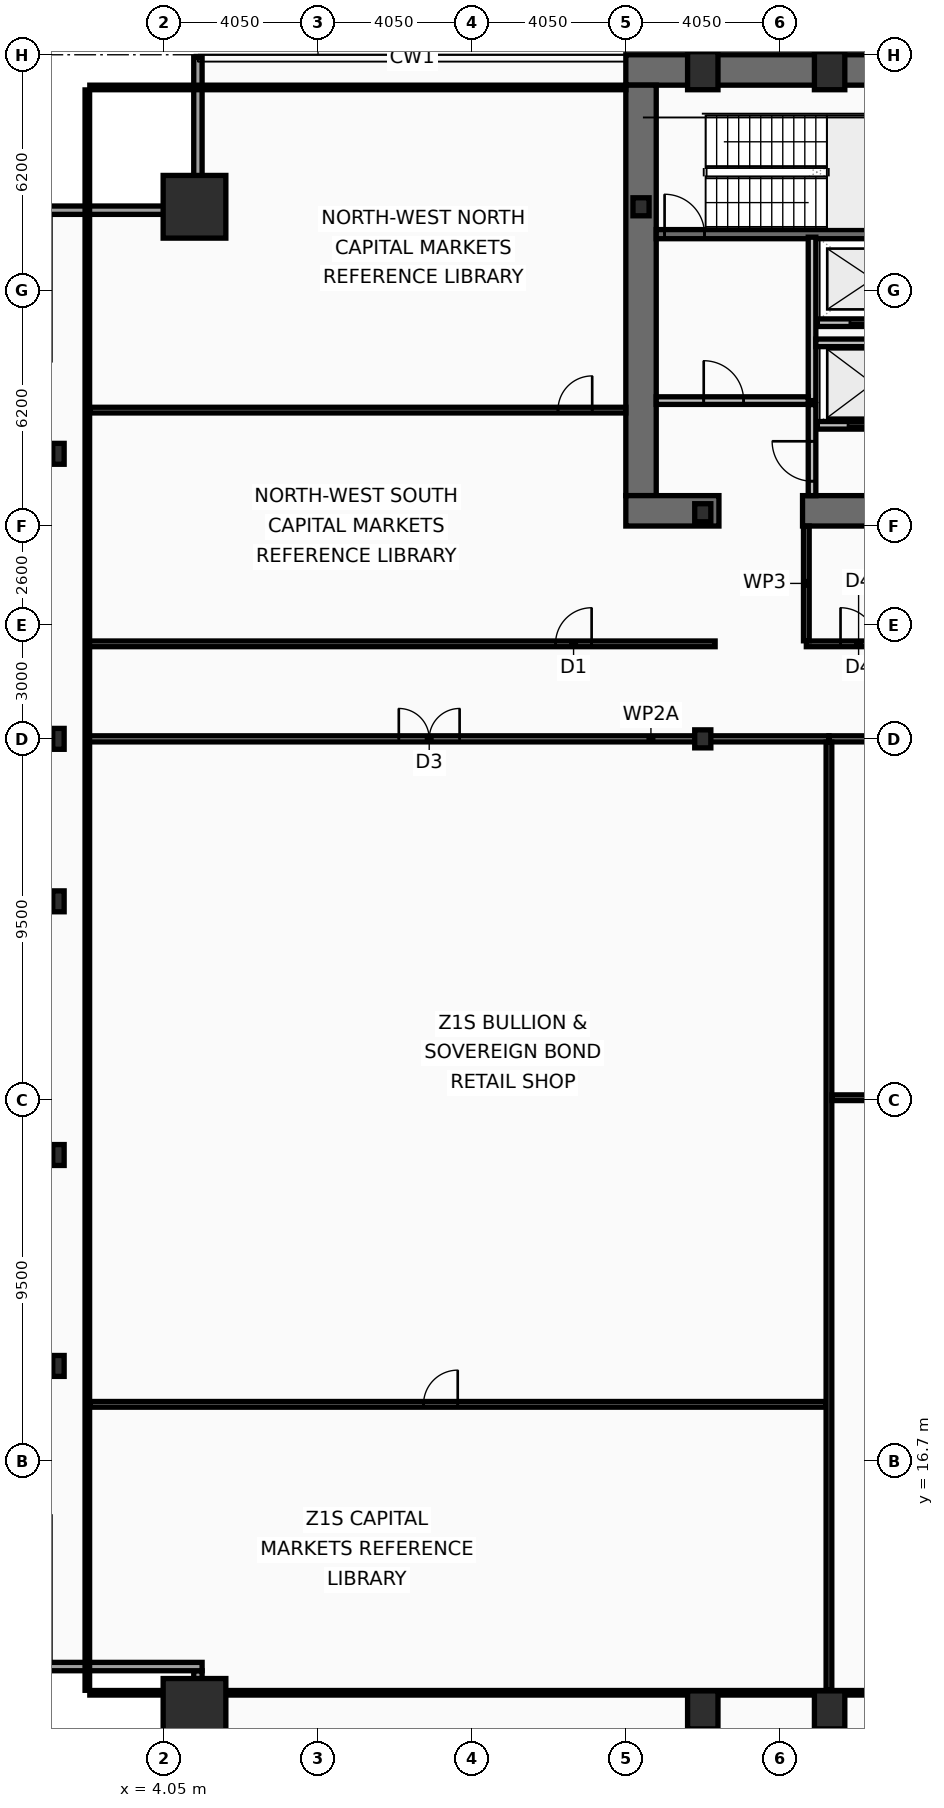
"""IFC4 building model, lengths in metres.
Left out: names, types, materials, properties, quantities, classifications, styles, units other than length and angle.
Written with IfcOpenShell. Run it as: python <this file> out.ifc"""

import sys

from ifc_helpers import new_model, si_unit, direction, frame, frame_2d, origin, origin_2d, place, context, subcontext, project, spatial, rectangle, hollow_rectangle, i_section, extrude, element, fill, save


model = new_model("IFC4")
c1 = context("Model", 3, precision=1e-05, world=origin(), true_north=direction((0.0, 1.0)))
c2 = subcontext(c1, "Body", "Model", "MODEL_VIEW")
j1 = project(units=[si_unit("LENGTHUNIT", "METRE"), si_unit("PLANEANGLEUNIT", "RADIAN")], contexts=[c1])
p1 = place(None, origin())
s1 = spatial("IfcSite", under=j1, at=p1, CompositionType="ELEMENT")
p2 = place(p1, origin())
s2 = spatial("IfcBuilding", under=s1, at=p2, CompositionType="ELEMENT")
p3 = place(p2, frame((0.0, 0.0, 53.8)))
s3 = spatial("IfcBuildingStorey", under=s2, at=p3, CompositionType="ELEMENT", Elevation=53.8)
p4 = place(p3, frame((16.2, 53.3, 0.0), z_axis=(0.0, 0.0, 1.0), x_axis=(1.0, 0.0, 0.0)))
e1 = element("IfcWall", 1, at=p4, inside=s3, PredefinedType="SHEAR", context=c2, shape_type="SweptSolid", body=[
    extrude(rectangle(XDim=40.5, YDim=0.8, at=frame_2d((20.25, 0.0))), origin(), (0.0, 0.0, 1.0), 3.82),
])
p5 = place(p3, frame((16.6, 42.1, 0.0), z_axis=(0.0, 0.0, 1.0), x_axis=(0.0, 1.0, 0.0)))
e2 = element("IfcWall", 2, at=p5, inside=s3, PredefinedType="SHEAR", context=c2, shape_type="SweptSolid", body=[
    extrude(rectangle(XDim=10.8, YDim=0.8, at=frame_2d((5.4, 0.0))), origin(), (0.0, 0.0, 1.0), 3.82),
])
p6 = place(p3, frame((18.65, 41.7, 0.0), z_axis=(0.0, 0.0, 1.0), x_axis=(-1.0, 0.0, 0.0)))
e3 = element("IfcWall", 3, at=p6, inside=s3, PredefinedType="SHEAR", context=c2, shape_type="SweptSolid", body=[
    extrude(rectangle(XDim=2.45, YDim=0.8, at=frame_2d((1.225, 0.0))), origin(), (0.0, 0.0, 1.0), 3.82),
])
p7 = place(p3, frame((32.3, 41.7, 0.0), z_axis=(0.0, 0.0, 1.0), x_axis=(-1.0, 0.0, 0.0)))
e4 = element("IfcWall", 4, at=p7, inside=s3, PredefinedType="SHEAR", context=c2, shape_type="SweptSolid", body=[
    extrude(rectangle(XDim=11.45, YDim=0.8, at=frame_2d((5.725, 0.0))), origin(), (0.0, 0.0, 1.0), 3.82),
])
p8 = place(p3, frame((17.0, 48.98, 0.0), z_axis=(0.0, 0.0, 1.0), x_axis=(1.0, 0.0, 0.0)))
e5 = element("IfcWall", 5, at=p8, inside=s3, PredefinedType="SHEAR", context=c2, shape_type="SweptSolid", body=[
    extrude(rectangle(XDim=7.22, YDim=0.24, at=frame_2d((3.61, 0.0))), origin(), (0.0, 0.0, 1.0), 3.82),
])
p9 = place(p8, frame((0.22, 0.0, 0.0)))
e6 = element("IfcOpeningElement", 6, at=p9, cuts=e5, PredefinedType="OPENING", context=c2, shape_type="SweptSolid", body=[
    extrude(rectangle(XDim=1.05, YDim=2.15, at=frame_2d((0.525, 1.075))), frame((0.0, 0.13, 0.0), z_axis=(0.0, -1.0, 0.0), x_axis=(1.0, 0.0, 0.0)), (0.0, 0.0, 1.0), 0.26),
])
for number, where, z_axis, x_axis in (
    (7, (4.85, 10.15, 0.0), (0.0, 0.0, 1.0), (1.0, 0.0, 0.0)),
    (8, (4.85, 49.7, 0.0), (0.0, 0.0, 1.0), (1.0, 0.0, 0.0)),
):
    element("IfcColumn", number, at=place(p3, frame(where, z_axis=z_axis, x_axis=x_axis)), inside=s3, PredefinedType="COLUMN", context=c2, shape_type="SweptSolid", body=[
        extrude(hollow_rectangle(XDim=1.65, YDim=1.65, WallThickness=0.075, at=origin_2d()), origin(), (0.0, 0.0, 1.0), 4.0),
    ])
for number, where, z_axis, x_axis in (
    (9, (18.225, 10.15, 0.0), (0.0, 0.0, 1.0), (1.0, 0.0, 0.0)),
    (10, (21.562, 10.15, 0.0), (0.0, 0.0, 1.0), (1.0, 0.0, 0.0)),
    (11, (18.225, 53.28, 0.0), (0.0, 0.0, 1.0), (1.0, 0.0, 0.0)),
    (12, (21.562, 53.28, 0.0), (0.0, 0.0, 1.0), (1.0, 0.0, 0.0)),
):
    element("IfcColumn", number, at=place(p3, frame(where, z_axis=z_axis, x_axis=x_axis)), inside=s3, PredefinedType="COLUMN", context=c2, shape_type="SweptSolid", body=[
        extrude(hollow_rectangle(XDim=0.8, YDim=1.0, WallThickness=0.055, at=origin_2d()), origin(), (0.0, 0.0, 1.0), 4.0),
    ])
for number, where, z_axis, x_axis in (
    (13, (1.27, 19.2, 0.0), (0.0, 0.0, 1.0), (1.0, 0.0, 0.0)),
    (14, (1.27, 24.75, 0.0), (0.0, 0.0, 1.0), (1.0, 0.0, 0.0)),
    (15, (1.27, 31.425, 0.0), (0.0, 0.0, 1.0), (1.0, 0.0, 0.0)),
    (16, (1.27, 35.7, 0.0), (0.0, 0.0, 1.0), (1.0, 0.0, 0.0)),
    (17, (1.27, 43.2, 0.0), (0.0, 0.0, 1.0), (1.0, 0.0, 0.0)),
):
    element("IfcColumn", number, at=place(p3, frame(where, z_axis=z_axis, x_axis=x_axis)), inside=s3, PredefinedType="COLUMN", context=c2, shape_type="SweptSolid", body=[
        extrude(i_section(OverallWidth=0.3, OverallDepth=0.55, WebThickness=0.015, FlangeThickness=0.029, at=origin_2d()), origin(), (0.0, 0.0, 1.0), 4.0),
    ])
for number, where, z_axis, x_axis in (
    (18, (16.6, 49.7, 0.0), (0.0, 0.0, 1.0), (1.0, 0.0, 0.0)),
    (19, (18.225, 35.7, 0.0), (0.0, 0.0, 1.0), (1.0, 0.0, 0.0)),
    (20, (18.225, 41.65, 0.0), (0.0, 0.0, 1.0), (1.0, 0.0, 0.0)),
):
    element("IfcColumn", number, at=place(p3, frame(where, z_axis=z_axis, x_axis=x_axis)), inside=s3, PredefinedType="COLUMN", context=c2, shape_type="SweptSolid", body=[
        extrude(i_section(OverallWidth=0.424, OverallDepth=0.474, WebThickness=0.048, FlangeThickness=0.077, at=origin_2d()), origin(), (0.0, 0.0, 1.0), 4.0),
    ])
p10 = place(p3, frame((4.94, 7.27, 0.0), z_axis=(0.0, 0.0, 1.0), x_axis=(0.0, 1.0, 0.0)))
e21 = element("IfcWall", 21, at=p10, inside=s3, PredefinedType="SOLIDWALL", context=c2, shape_type="SweptSolid", body=[
    extrude(rectangle(XDim=3.91, YDim=0.22, at=frame_2d((1.955, 0.0))), origin(), (0.0, 0.0, 1.0), 3.16),
])
for number, where, z_axis, x_axis in (
    (22, (5.05, 11.29, 0.0), (0.0, 0.0, 1.0), (-1.0, 0.0, 0.0)),
    (23, (0.83, 49.61, 0.0), (0.0, 0.0, 1.0), (1.0, 0.0, 0.0)),
):
    element("IfcWall", number, at=place(p3, frame(where, z_axis=z_axis, x_axis=x_axis)), inside=s3, PredefinedType="SOLIDWALL", context=c2, shape_type="SweptSolid", body=[
        extrude(rectangle(XDim=4.22, YDim=0.22, at=frame_2d((2.11, 0.0))), origin(), (0.0, 0.0, 1.0), 3.16),
    ])
p11 = place(p3, frame((4.94, 49.72, 0.0), z_axis=(0.0, 0.0, 1.0), x_axis=(0.0, 1.0, 0.0)))
e24 = element("IfcWall", 24, at=p11, inside=s3, PredefinedType="SOLIDWALL", context=c2, shape_type="SweptSolid", body=[
    extrude(rectangle(XDim=3.91, YDim=0.22, at=frame_2d((1.955, 0.0))), origin(), (0.0, 0.0, 1.0), 3.16),
])
p12 = place(p3, frame((24.21, 43.95, 0.0), z_axis=(0.0, 0.0, 1.0), x_axis=(-1.0, 0.0, 0.0)))
e25 = element("IfcWall", 25, at=p12, inside=s3, PredefinedType="PARTITIONING", context=c2, shape_type="SweptSolid", body=[
    extrude(rectangle(XDim=2.97, YDim=0.2, at=frame_2d((1.485, 0.0))), origin(), (0.0, 0.0, 1.0), 3.82),
])
p13 = place(p12, frame((0.86, 0.0, 0.0)))
e26 = element("IfcOpeningElement", 26, at=p13, cuts=e25, PredefinedType="OPENING", context=c2, shape_type="SweptSolid", body=[
    extrude(rectangle(XDim=1.3, YDim=2.18, at=frame_2d((0.65, 1.09))), frame((0.0, 0.11, 0.0), z_axis=(0.0, -1.0, 0.0), x_axis=(1.0, 0.0, 0.0)), (0.0, 0.0, 1.0), 0.22),
])
p14 = place(p3, frame((24.21, 46.65, 0.0), z_axis=(0.0, 0.0, 1.0), x_axis=(-1.0, 0.0, 0.0)))
e27 = element("IfcWall", 27, at=p14, inside=s3, PredefinedType="PARTITIONING", context=c2, shape_type="SweptSolid", body=[
    extrude(rectangle(XDim=2.97, YDim=0.2, at=frame_2d((1.485, 0.0))), origin(), (0.0, 0.0, 1.0), 3.82),
])
p15 = place(p14, frame((0.91, 0.0, 0.0)))
e28 = element("IfcOpeningElement", 28, at=p15, cuts=e27, PredefinedType="OPENING", context=c2, shape_type="SweptSolid", body=[
    extrude(rectangle(XDim=1.2, YDim=2.18, at=frame_2d((0.6, 1.09))), frame((0.0, 0.11, 0.0), z_axis=(0.0, -1.0, 0.0), x_axis=(1.0, 0.0, 0.0)), (0.0, 0.0, 1.0), 0.22),
])
p16 = place(p3, frame((21.1, 44.6, 0.0), z_axis=(0.0, 0.0, 1.0), x_axis=(0.0, 1.0, 0.0)))
e29 = element("IfcWall", 29, at=p16, inside=s3, PredefinedType="PARTITIONING", context=c2, shape_type="SweptSolid", body=[
    extrude(rectangle(XDim=4.3, YDim=0.2, at=frame_2d((2.15, 0.0))), origin(), (0.0, 0.0, 1.0), 3.82),
])
p17 = place(p3, frame((17.0, 44.6, 0.0), z_axis=(0.0, 0.0, 1.0), x_axis=(1.0, 0.0, 0.0)))
e30 = element("IfcWall", 30, at=p17, inside=s3, PredefinedType="PARTITIONING", context=c2, shape_type="SweptSolid", body=[
    extrude(rectangle(XDim=4.0, YDim=0.2, at=frame_2d((2.0, 0.0))), origin(), (0.0, 0.0, 1.0), 3.82),
])
p18 = place(p17, frame((1.25, 0.0, 0.0)))
e31 = element("IfcOpeningElement", 31, at=p18, cuts=e30, PredefinedType="OPENING", context=c2, shape_type="SweptSolid", body=[
    extrude(rectangle(XDim=1.05, YDim=2.15, at=frame_2d((0.525, 1.075))), frame((0.0, 0.11, 0.0), z_axis=(0.0, -1.0, 0.0), x_axis=(1.0, 0.0, 0.0)), (0.0, 0.0, 1.0), 0.22),
])
p19 = place(p3, frame((21.2, 46.12, 0.0), z_axis=(0.0, 0.0, 1.0), x_axis=(1.0, 0.0, 0.0)))
e32 = element("IfcWall", 32, at=p19, inside=s3, PredefinedType="PARTITIONING", context=c2, shape_type="SweptSolid", body=[
    extrude(rectangle(XDim=3.02, YDim=0.2, at=frame_2d((1.51, 0.0))), origin(), (0.0, 0.0, 1.0), 3.82),
])
p20 = place(p3, frame((21.1, 42.1, 0.0), z_axis=(0.0, 0.0, 1.0), x_axis=(0.0, 1.0, 0.0)))
e33 = element("IfcWall", 33, at=p20, inside=s3, PredefinedType="PARTITIONING", context=c2, shape_type="SweptSolid", body=[
    extrude(rectangle(XDim=2.395, YDim=0.2, at=frame_2d((1.198, 0.0))), origin(), (0.0, 0.0, 1.0), 3.82),
])
p21 = place(p20, frame((0.38, 0.0, 0.0)))
e34 = element("IfcOpeningElement", 34, at=p21, cuts=e33, PredefinedType="OPENING", context=c2, shape_type="SweptSolid", body=[
    extrude(rectangle(XDim=1.05, YDim=2.15, at=frame_2d((0.525, 1.075))), frame((0.0, 0.11, 0.0), z_axis=(0.0, -1.0, 0.0), x_axis=(1.0, 0.0, 0.0)), (0.0, 0.0, 1.0), 0.22),
])
p22 = place(p3, frame((20.95, 38.2, 0.0), z_axis=(0.0, 0.0, 1.0), x_axis=(1.0, 0.0, 0.0)))
e35 = element("IfcWall", 35, at=p22, inside=s3, PredefinedType="PARTITIONING", context=c2, shape_type="SweptSolid", body=[
    extrude(rectangle(XDim=4.55, YDim=0.15, at=frame_2d((2.275, 0.0))), origin(), (0.0, 0.0, 1.0), 3.01),
])
p23 = place(p22, frame((0.9, 0.0, 0.0)))
e36 = element("IfcOpeningElement", 36, at=p23, cuts=e35, PredefinedType="OPENING", context=c2, shape_type="SweptSolid", body=[
    extrude(rectangle(XDim=0.95, YDim=2.05, at=frame_2d((0.475, 1.025))), frame((0.0, 0.085, 0.0), z_axis=(0.0, -1.0, 0.0), x_axis=(1.0, 0.0, 0.0)), (0.0, 0.0, 1.0), 0.17),
])
p24 = place(p3, frame((20.95, 38.28, 0.0), z_axis=(0.0, 0.0, 1.0), x_axis=(0.0, 1.0, 0.0)))
e37 = element("IfcWall", 37, at=p24, inside=s3, PredefinedType="PARTITIONING", context=c2, shape_type="SweptSolid", body=[
    extrude(rectangle(XDim=3.02, YDim=0.15, at=frame_2d((1.51, 0.0))), origin(), (0.0, 0.0, 1.0), 3.82),
])
p25 = place(p3, frame((2.03, 38.2, 0.0), z_axis=(0.0, 0.0, 1.0), x_axis=(1.0, 0.0, 0.0)))
e38 = element("IfcWall", 38, at=p25, inside=s3, PredefinedType="PARTITIONING", context=c2, shape_type="SweptSolid", body=[
    extrude(rectangle(XDim=16.52, YDim=0.15, at=frame_2d((8.26, 0.0))), origin(), (0.0, 0.0, 1.0), 3.01),
])
p26 = place(p25, frame((12.32, 0.0, 0.0)))
e39 = element("IfcOpeningElement", 39, at=p26, cuts=e38, PredefinedType="OPENING", context=c2, shape_type="SweptSolid", body=[
    extrude(rectangle(XDim=0.95, YDim=2.05, at=frame_2d((0.475, 1.025))), frame((0.0, 0.085, 0.0), z_axis=(0.0, -1.0, 0.0), x_axis=(1.0, 0.0, 0.0)), (0.0, 0.0, 1.0), 0.17),
])
p27 = place(p3, frame((2.095, 44.35, 0.0), z_axis=(0.0, 0.0, 1.0), x_axis=(1.0, 0.0, 0.0)))
e40 = element("IfcWall", 40, at=p27, inside=s3, PredefinedType="PARTITIONING", context=c2, shape_type="SweptSolid", body=[
    extrude(rectangle(XDim=14.105, YDim=0.15, at=frame_2d((7.052, 0.0))), origin(), (0.0, 0.0, 1.0), 3.16),
])
p28 = place(p27, frame((12.32, 0.0, 0.0)))
e41 = element("IfcOpeningElement", 41, at=p28, cuts=e40, PredefinedType="OPENING", context=c2, shape_type="SweptSolid", body=[
    extrude(rectangle(XDim=0.9, YDim=2.05, at=frame_2d((0.45, 1.025))), frame((0.0, 0.085, 0.0), z_axis=(0.0, -1.0, 0.0), x_axis=(1.0, 0.0, 0.0)), (0.0, 0.0, 1.0), 0.17),
])
p29 = place(p3, frame((2.03, 35.7, 0.0), z_axis=(0.0, 0.0, 1.0), x_axis=(1.0, 0.0, 0.0)))
e42 = element("IfcWall", 42, at=p29, inside=s3, PredefinedType="PARTITIONING", context=c2, shape_type="SweptSolid", body=[
    extrude(rectangle(XDim=19.515, YDim=0.16, at=frame_2d((9.758, 0.0))), origin(), (0.0, 0.0, 1.0), 3.01),
])
p30 = place(p29, frame((8.196, 0.0, 0.0)))
e43 = element("IfcOpeningElement", 43, at=p30, cuts=e42, PredefinedType="OPENING", context=c2, shape_type="SweptSolid", body=[
    extrude(rectangle(XDim=1.6, YDim=2.15, at=frame_2d((0.8, 1.075))), frame((0.0, 0.09, 0.0), z_axis=(0.0, -1.0, 0.0), x_axis=(1.0, 0.0, 0.0)), (0.0, 0.0, 1.0), 0.18),
])
p31 = place(p3, frame((2.095, 18.19, 0.0), z_axis=(0.0, 0.0, 1.0), x_axis=(1.0, 0.0, 0.0)))
e44 = element("IfcWall", 44, at=p31, inside=s3, PredefinedType="PARTITIONING", context=c2, shape_type="SweptSolid", body=[
    extrude(rectangle(XDim=19.37, YDim=0.15, at=frame_2d((9.685, 0.0))), origin(), (0.0, 0.0, 1.0), 3.01),
])
p32 = place(p31, frame((8.782, 0.0, 0.0)))
e45 = element("IfcOpeningElement", 45, at=p32, cuts=e44, PredefinedType="OPENING", context=c2, shape_type="SweptSolid", body=[
    extrude(rectangle(XDim=0.9, YDim=2.05, at=frame_2d((0.45, 1.025))), frame((0.0, 0.085, 0.0), z_axis=(0.0, -1.0, 0.0), x_axis=(1.0, 0.0, 0.0)), (0.0, 0.0, 1.0), 0.17),
])
p33 = place(p3, frame((21.545, 35.7, 0.0), z_axis=(0.0, 0.0, 1.0), x_axis=(1.0, 0.0, 0.0)))
e46 = element("IfcWall", 46, at=p33, inside=s3, PredefinedType="PARTITIONING", context=c2, shape_type="SweptSolid", body=[
    extrude(rectangle(XDim=13.068, YDim=0.16, at=frame_2d((6.534, 0.0))), origin(), (0.0, 0.0, 1.0), 3.01),
])
p34 = place(p33, frame((5.489, 0.0, 0.0)))
e47 = element("IfcOpeningElement", 47, at=p34, cuts=e46, PredefinedType="OPENING", context=c2, shape_type="SweptSolid", body=[
    extrude(rectangle(XDim=1.0, YDim=2.05, at=frame_2d((0.5, 1.025))), frame((0.0, 0.09, 0.0), z_axis=(0.0, -1.0, 0.0), x_axis=(1.0, 0.0, 0.0)), (0.0, 0.0, 1.0), 0.18),
])
p35 = place(p3, frame((21.545, 10.665, 0.0), z_axis=(0.0, 0.0, 1.0), x_axis=(0.0, 1.0, 0.0)))
e48 = element("IfcWall", 48, at=p35, inside=s3, PredefinedType="PARTITIONING", context=c2, shape_type="SweptSolid", body=[
    extrude(rectangle(XDim=24.95, YDim=0.15, at=frame_2d((12.475, 0.0))), origin(), (0.0, 0.0, 1.0), 3.21),
])
p36 = place(p3, frame((21.625, 26.257, 0.0), z_axis=(0.0, 0.0, 1.0), x_axis=(1.0, 0.0, 0.0)))
e49 = element("IfcWall", 49, at=p36, inside=s3, PredefinedType="PARTITIONING", context=c2, shape_type="SweptSolid", body=[
    extrude(rectangle(XDim=12.908, YDim=0.15, at=frame_2d((6.454, 0.0))), origin(), (0.0, 0.0, 1.0), 3.01),
])
p37 = place(p36, frame((5.881, 0.0, 0.0)))
e50 = element("IfcOpeningElement", 50, at=p37, cuts=e49, PredefinedType="OPENING", context=c2, shape_type="SweptSolid", body=[
    extrude(rectangle(XDim=0.9, YDim=2.05, at=frame_2d((0.45, 1.025))), frame((0.0, 0.085, 0.0), z_axis=(0.0, -1.0, 0.0), x_axis=(1.0, 0.0, 0.0)), (0.0, 0.0, 1.0), 0.17),
])
p38 = place(p3, frame((2.03, 10.665, 0.0), z_axis=(0.0, 0.0, 1.0), x_axis=(0.0, 1.0, 0.0)))
e51 = element("IfcWall", 51, at=p38, inside=s3, PredefinedType="PARTITIONING", context=c2, shape_type="SweptSolid", body=[
    extrude(rectangle(XDim=42.11, YDim=0.12, at=frame_2d((21.055, 0.0))), origin(), (0.0, 0.0, 1.0), 3.01),
])
p39 = place(p3, frame((2.095, 52.84, 0.0), z_axis=(0.0, 0.0, 1.0), x_axis=(1.0, 0.0, 0.0)))
e52 = element("IfcWall", 52, at=p39, inside=s3, PredefinedType="PARTITIONING", context=c2, shape_type="SweptSolid", body=[
    extrude(rectangle(XDim=14.105, YDim=0.12, at=frame_2d((7.052, 0.0))), origin(), (0.0, 0.0, 1.0), 3.82),
])
p40 = place(p3, frame((2.095, 10.6, 0.0), z_axis=(0.0, 0.0, 1.0), x_axis=(1.0, 0.0, 0.0)))
e53 = element("IfcWall", 53, at=p40, inside=s3, PredefinedType="PARTITIONING", context=c2, shape_type="SweptSolid", body=[
    extrude(rectangle(XDim=68.71, YDim=0.12, at=frame_2d((34.355, 0.0))), origin(), (0.0, 0.0, 1.0), 3.01),
])
p41 = place(p9, origin())
e54 = element("IfcDoor", 54, at=p41, inside=s3, OperationType="SINGLE_SWING_LEFT", PredefinedType="DOOR", context=c2, shape_type="SweptSolid", body=[
    extrude(rectangle(XDim=1.05, YDim=2.15, at=frame_2d((0.525, 1.075))), frame((0.0, 0.025, 0.0), z_axis=(0.0, -1.0, 0.0), x_axis=(1.0, 0.0, 0.0)), (0.0, 0.0, 1.0), 0.05),
])
fill(e6, e54)
p42 = place(p13, origin())
e55 = element("IfcDoor", 55, at=p42, inside=s3, OperationType="SLIDING_TO_LEFT", PredefinedType="DOOR", context=c2, shape_type="SweptSolid", body=[
    extrude(rectangle(XDim=1.3, YDim=2.18, at=frame_2d((0.65, 1.09))), frame((0.0, 0.025, 0.0), z_axis=(0.0, -1.0, 0.0), x_axis=(1.0, 0.0, 0.0)), (0.0, 0.0, 1.0), 0.05),
])
fill(e26, e55)
p43 = place(p15, origin())
e56 = element("IfcDoor", 56, at=p43, inside=s3, OperationType="SLIDING_TO_LEFT", PredefinedType="DOOR", context=c2, shape_type="SweptSolid", body=[
    extrude(rectangle(XDim=1.2, YDim=2.18, at=frame_2d((0.6, 1.09))), frame((0.0, 0.025, 0.0), z_axis=(0.0, -1.0, 0.0), x_axis=(1.0, 0.0, 0.0)), (0.0, 0.0, 1.0), 0.05),
])
fill(e28, e56)
p44 = place(p18, origin())
e57 = element("IfcDoor", 57, at=p44, inside=s3, OperationType="SINGLE_SWING_LEFT", PredefinedType="DOOR", context=c2, shape_type="SweptSolid", body=[
    extrude(rectangle(XDim=1.05, YDim=2.15, at=frame_2d((0.525, 1.075))), frame((0.0, 0.025, 0.0), z_axis=(0.0, -1.0, 0.0), x_axis=(1.0, 0.0, 0.0)), (0.0, 0.0, 1.0), 0.05),
])
fill(e31, e57)
p45 = place(p21, origin())
e58 = element("IfcDoor", 58, at=p45, inside=s3, OperationType="SINGLE_SWING_RIGHT", PredefinedType="DOOR", context=c2, shape_type="SweptSolid", body=[
    extrude(rectangle(XDim=1.05, YDim=2.15, at=frame_2d((0.525, 1.075))), frame((0.0, 0.025, 0.0), z_axis=(0.0, -1.0, 0.0), x_axis=(1.0, 0.0, 0.0)), (0.0, 0.0, 1.0), 0.05),
])
fill(e34, e58)
p46 = place(p23, origin())
e59 = element("IfcDoor", 59, at=p46, inside=s3, OperationType="SINGLE_SWING_LEFT", PredefinedType="DOOR", context=c2, shape_type="SweptSolid", body=[
    extrude(rectangle(XDim=0.95, YDim=2.05, at=frame_2d((0.475, 1.025))), frame((0.0, 0.025, 0.0), z_axis=(0.0, -1.0, 0.0), x_axis=(1.0, 0.0, 0.0)), (0.0, 0.0, 1.0), 0.05),
])
fill(e36, e59)
p47 = place(p26, origin())
e60 = element("IfcDoor", 60, at=p47, inside=s3, OperationType="SINGLE_SWING_RIGHT", PredefinedType="DOOR", context=c2, shape_type="SweptSolid", body=[
    extrude(rectangle(XDim=0.95, YDim=2.05, at=frame_2d((0.475, 1.025))), frame((0.0, 0.025, 0.0), z_axis=(0.0, -1.0, 0.0), x_axis=(1.0, 0.0, 0.0)), (0.0, 0.0, 1.0), 0.05),
])
fill(e39, e60)
p48 = place(p28, origin())
e61 = element("IfcDoor", 61, at=p48, inside=s3, OperationType="SINGLE_SWING_RIGHT", PredefinedType="DOOR", context=c2, shape_type="SweptSolid", body=[
    extrude(rectangle(XDim=0.9, YDim=2.05, at=frame_2d((0.45, 1.025))), frame((0.0, 0.025, 0.0), z_axis=(0.0, -1.0, 0.0), x_axis=(1.0, 0.0, 0.0)), (0.0, 0.0, 1.0), 0.05),
])
fill(e41, e61)
p49 = place(p30, origin())
e62 = element("IfcDoor", 62, at=p49, inside=s3, OperationType="DOUBLE_DOOR_SINGLE_SWING", PredefinedType="DOOR", context=c2, shape_type="SweptSolid", body=[
    extrude(rectangle(XDim=1.6, YDim=2.15, at=frame_2d((0.8, 1.075))), frame((0.0, 0.025, 0.0), z_axis=(0.0, -1.0, 0.0), x_axis=(1.0, 0.0, 0.0)), (0.0, 0.0, 1.0), 0.05),
])
fill(e43, e62)
p50 = place(p32, origin())
e63 = element("IfcDoor", 63, at=p50, inside=s3, OperationType="SINGLE_SWING_RIGHT", PredefinedType="DOOR", context=c2, shape_type="SweptSolid", body=[
    extrude(rectangle(XDim=0.9, YDim=2.05, at=frame_2d((0.45, 1.025))), frame((0.0, 0.025, 0.0), z_axis=(0.0, -1.0, 0.0), x_axis=(1.0, 0.0, 0.0)), (0.0, 0.0, 1.0), 0.05),
])
fill(e45, e63)
save(model, sys.argv[1])
